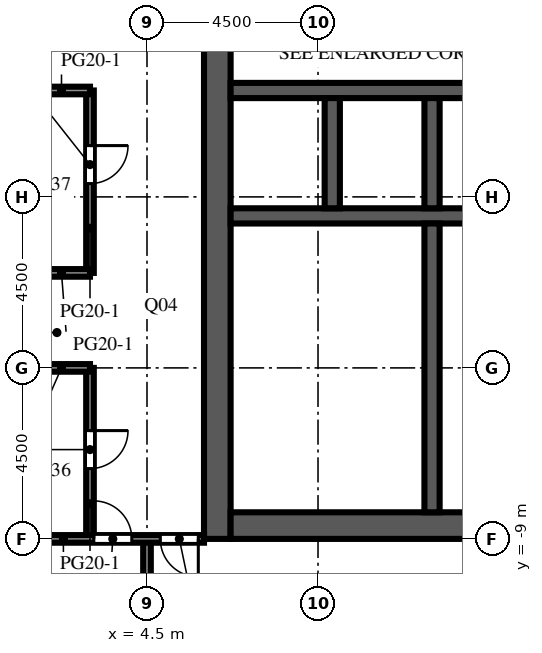
"""IFC4 building model, lengths in metres.
Left out: names, types, materials, properties, quantities, classifications, styles, units other than length and angle.
Written with IfcOpenShell. Run it as: python <this file> out.ifc"""

import sys

from ifc_helpers import new_model, si_unit, direction, frame, frame_2d, origin, place, context, subcontext, project, spatial, rectangle, extrude, element, fill, save


model = new_model("IFC4")
c1 = context("Model", 3, precision=1e-05, world=origin(), true_north=direction((0.0, 1.0)))
c2 = subcontext(c1, "Body", "Model", "MODEL_VIEW")
j1 = project(units=[si_unit("LENGTHUNIT", "METRE"), si_unit("PLANEANGLEUNIT", "RADIAN")], contexts=[c1])
p1 = place(None, origin())
s1 = spatial("IfcSite", under=j1, at=p1, CompositionType="ELEMENT")
p2 = place(p1, origin())
s2 = spatial("IfcBuilding", under=s1, at=p2, CompositionType="ELEMENT")
p3 = place(p2, frame((0.0, 0.0, 239.8)))
s3 = spatial("IfcBuildingStorey", under=s2, at=p3, CompositionType="ELEMENT", Elevation=239.8)
p4 = place(p3, frame((6.35, -9.0, 0.0), z_axis=(0.0, 0.0, 1.0), x_axis=(0.0, 1.0, 0.0)))
e1 = element("IfcWall", 1, at=p4, inside=s3, PredefinedType="SHEAR", context=c2, shape_type="SweptSolid", body=[
    extrude(rectangle(XDim=27.5, YDim=0.7, at=frame_2d((13.75, 0.0))), origin(), (0.0, 0.0, 1.0), 4.1),
])
p5 = place(p4, frame((12.55, 0.0, 0.0)))
e2 = element("IfcOpeningElement", 2, at=p5, cuts=e1, PredefinedType="OPENING", context=c2, shape_type="SweptSolid", body=[
    extrude(rectangle(XDim=2.4, YDim=2.4, at=frame_2d((1.2, 1.2))), frame((0.0, 0.36, 0.0), z_axis=(0.0, -1.0, 0.0), x_axis=(1.0, 0.0, 0.0)), (0.0, 0.0, 1.0), 0.72),
])
p6 = place(p4, frame((5.42, 0.0, 0.0)))
e3 = element("IfcOpeningElement", 3, at=p6, cuts=e1, PredefinedType="OPENING", context=c2, shape_type="SweptSolid", body=[
    extrude(rectangle(XDim=1.2, YDim=2.1, at=frame_2d((0.6, 1.05))), frame((0.0, 0.36, 0.0), z_axis=(0.0, -1.0, 0.0), x_axis=(1.0, 0.0, 0.0)), (0.0, 0.0, 1.0), 0.72),
])
p7 = place(p4, frame((19.46, 0.0, 0.0)))
e4 = element("IfcOpeningElement", 4, at=p7, cuts=e1, PredefinedType="OPENING", context=c2, shape_type="SweptSolid", body=[
    extrude(rectangle(XDim=1.0, YDim=2.1, at=frame_2d((0.5, 1.05))), frame((0.0, 0.36, 0.0), z_axis=(0.0, -1.0, 0.0), x_axis=(1.0, 0.0, 0.0)), (0.0, 0.0, 1.0), 0.72),
])
p8 = place(p4, frame((21.17, 0.0, 0.0)))
e5 = element("IfcOpeningElement", 5, at=p8, cuts=e1, PredefinedType="OPENING", context=c2, shape_type="SweptSolid", body=[
    extrude(rectangle(XDim=1.0, YDim=2.1, at=frame_2d((0.5, 1.05))), frame((0.0, 0.36, 0.0), z_axis=(0.0, -1.0, 0.0), x_axis=(1.0, 0.0, 0.0)), (0.0, 0.0, 1.0), 0.72),
])
p9 = place(p4, frame((23.26, 0.0, 0.0)))
e6 = element("IfcOpeningElement", 6, at=p9, cuts=e1, PredefinedType="OPENING", context=c2, shape_type="SweptSolid", body=[
    extrude(rectangle(XDim=1.0, YDim=2.1, at=frame_2d((0.5, 1.05))), frame((0.0, 0.36, 0.0), z_axis=(0.0, -1.0, 0.0), x_axis=(1.0, 0.0, 0.0)), (0.0, 0.0, 1.0), 0.72),
])
p10 = place(p4, frame((25.35, 0.0, 0.0)))
e7 = element("IfcOpeningElement", 7, at=p10, cuts=e1, PredefinedType="OPENING", context=c2, shape_type="SweptSolid", body=[
    extrude(rectangle(XDim=1.0, YDim=2.1, at=frame_2d((0.5, 1.05))), frame((0.0, 0.36, 0.0), z_axis=(0.0, -1.0, 0.0), x_axis=(1.0, 0.0, 0.0)), (0.0, 0.0, 1.0), 0.72),
])
p11 = place(p3, frame((6.7, -8.65, 0.0), z_axis=(0.0, 0.0, 1.0), x_axis=(1.0, 0.0, 0.0)))
e8 = element("IfcWall", 8, at=p11, inside=s3, PredefinedType="SHEAR", context=c2, shape_type="SweptSolid", body=[
    extrude(rectangle(XDim=10.6, YDim=0.7, at=frame_2d((5.3, 0.0))), origin(), (0.0, 0.0, 1.0), 4.1),
])
p12 = place(p3, frame((6.7, -0.5, 0.0), z_axis=(0.0, 0.0, 1.0), x_axis=(1.0, 0.0, 0.0)))
e9 = element("IfcWall", 9, at=p12, inside=s3, PredefinedType="SHEAR", context=c2, shape_type="SweptSolid", body=[
    extrude(rectangle(XDim=10.6, YDim=0.4, at=frame_2d((5.3, 0.0))), origin(), (0.0, 0.0, 1.0), 4.1),
])
p13 = place(p3, frame((6.7, 2.8, 0.0), z_axis=(0.0, 0.0, 1.0), x_axis=(1.0, 0.0, 0.0)))
e10 = element("IfcWall", 10, at=p13, inside=s3, PredefinedType="SHEAR", context=c2, shape_type="SweptSolid", body=[
    extrude(rectangle(XDim=10.6, YDim=0.4, at=frame_2d((5.3, 0.0))), origin(), (0.0, 0.0, 1.0), 4.1),
])
p14 = place(p13, frame((0.688, 0.0, 0.0)))
e11 = element("IfcOpeningElement", 11, at=p14, cuts=e10, PredefinedType="OPENING", context=c2, shape_type="SweptSolid", body=[
    extrude(rectangle(XDim=1.1, YDim=2.1, at=frame_2d((0.55, 1.05))), frame((0.0, 0.21, 0.0), z_axis=(0.0, -1.0, 0.0), x_axis=(1.0, 0.0, 0.0)), (0.0, 0.0, 1.0), 0.42),
])
p15 = place(p13, frame((3.438, 0.0, 0.0)))
e12 = element("IfcOpeningElement", 12, at=p15, cuts=e10, PredefinedType="OPENING", context=c2, shape_type="SweptSolid", body=[
    extrude(rectangle(XDim=1.1, YDim=2.1, at=frame_2d((0.55, 1.05))), frame((0.0, 0.21, 0.0), z_axis=(0.0, -1.0, 0.0), x_axis=(1.0, 0.0, 0.0)), (0.0, 0.0, 1.0), 0.42),
])
p16 = place(p13, frame((6.113, 0.0, 0.0)))
e13 = element("IfcOpeningElement", 13, at=p16, cuts=e10, PredefinedType="OPENING", context=c2, shape_type="SweptSolid", body=[
    extrude(rectangle(XDim=1.0, YDim=2.1, at=frame_2d((0.5, 1.05))), frame((0.0, 0.21, 0.0), z_axis=(0.0, -1.0, 0.0), x_axis=(1.0, 0.0, 0.0)), (0.0, 0.0, 1.0), 0.42),
])
p17 = place(p13, frame((8.863, 0.0, 0.0)))
e14 = element("IfcOpeningElement", 14, at=p17, cuts=e10, PredefinedType="OPENING", context=c2, shape_type="SweptSolid", body=[
    extrude(rectangle(XDim=1.0, YDim=2.1, at=frame_2d((0.5, 1.05))), frame((0.0, 0.21, 0.0), z_axis=(0.0, -1.0, 0.0), x_axis=(1.0, 0.0, 0.0)), (0.0, 0.0, 1.0), 0.42),
])
for number, where, z_axis, x_axis in (
    (15, (9.375, -0.3, 0.0), (0.0, 0.0, 1.0), (0.0, 1.0, 0.0)),
    (16, (12.0, -0.3, 0.0), (0.0, 0.0, 1.0), (0.0, 1.0, 0.0)),
):
    element("IfcWall", number, at=place(p3, frame(where, z_axis=z_axis, x_axis=x_axis)), inside=s3, PredefinedType="SHEAR", context=c2, shape_type="SweptSolid", body=[
        extrude(rectangle(XDim=2.9, YDim=0.4, at=frame_2d((1.45, 0.0))), origin(), (0.0, 0.0, 1.0), 4.1),
    ])
p18 = place(p3, frame((12.0, -8.3, 0.0), z_axis=(0.0, 0.0, 1.0), x_axis=(0.0, 1.0, 0.0)))
e17 = element("IfcWall", 17, at=p18, inside=s3, PredefinedType="SHEAR", context=c2, shape_type="SweptSolid", body=[
    extrude(rectangle(XDim=7.6, YDim=0.4, at=frame_2d((3.8, 0.0))), origin(), (0.0, 0.0, 1.0), 4.1),
])
p19 = place(p3, frame((6.7, -5.26, 0.0), z_axis=(0.0, 0.0, 1.0), x_axis=(1.0, 0.0, 0.0)))
e18 = element("IfcWall", 18, at=p19, inside=s3, PredefinedType="PARTITIONING", context=c2, shape_type="SweptSolid", body=[
    extrude(rectangle(XDim=1.5, YDim=0.1, at=frame_2d((0.75, 0.0))), origin(), (0.0, 0.0, 1.0), 3.65),
])
p20 = place(p19, frame((0.25, 0.0, 0.0)))
e19 = element("IfcOpeningElement", 19, at=p20, cuts=e18, PredefinedType="OPENING", context=c2, shape_type="SweptSolid", body=[
    extrude(rectangle(XDim=1.0, YDim=2.1, at=frame_2d((0.5, 1.05))), frame((0.0, 0.06, 0.0), z_axis=(0.0, -1.0, 0.0), x_axis=(1.0, 0.0, 0.0)), (0.0, 0.0, 1.0), 0.12),
])
p21 = place(p3, frame((8.2, -5.26, 0.0), z_axis=(0.0, 0.0, 1.0), x_axis=(0.0, 1.0, 0.0)))
e20 = element("IfcWall", 20, at=p21, inside=s3, PredefinedType="PARTITIONING", context=c2, shape_type="SweptSolid", body=[
    extrude(rectangle(XDim=2.28, YDim=0.1, at=frame_2d((1.14, 0.0))), origin(), (0.0, 0.0, 1.0), 3.65),
])
p22 = place(p21, frame((0.64, 0.0, 0.0)))
e21 = element("IfcOpeningElement", 21, at=p22, cuts=e20, PredefinedType="OPENING", context=c2, shape_type="SweptSolid", body=[
    extrude(rectangle(XDim=1.0, YDim=2.1, at=frame_2d((0.5, 1.05))), frame((0.0, 0.06, 0.0), z_axis=(0.0, -1.0, 0.0), x_axis=(1.0, 0.0, 0.0)), (0.0, 0.0, 1.0), 0.12),
])
p23 = place(p3, frame((8.2, -2.98, 0.0), z_axis=(0.0, 0.0, 1.0), x_axis=(0.0, 1.0, 0.0)))
e22 = element("IfcWall", 22, at=p23, inside=s3, PredefinedType="PARTITIONING", context=c2, shape_type="SweptSolid", body=[
    extrude(rectangle(XDim=2.28, YDim=0.1, at=frame_2d((1.14, 0.0))), origin(), (0.0, 0.0, 1.0), 3.65),
])
p24 = place(p23, frame((0.64, 0.0, 0.0)))
e23 = element("IfcOpeningElement", 23, at=p24, cuts=e22, PredefinedType="OPENING", context=c2, shape_type="SweptSolid", body=[
    extrude(rectangle(XDim=1.0, YDim=2.1, at=frame_2d((0.5, 1.05))), frame((0.0, 0.06, 0.0), z_axis=(0.0, -1.0, 0.0), x_axis=(1.0, 0.0, 0.0)), (0.0, 0.0, 1.0), 0.12),
])
for number, where, z_axis, x_axis in (
    (24, (8.2, -5.26, 0.0), (0.0, 0.0, 1.0), (1.0, 0.0, 0.0)),
    (25, (8.2, -2.98, 0.0), (0.0, 0.0, 1.0), (1.0, 0.0, 0.0)),
):
    element("IfcWall", number, at=place(p3, frame(where, z_axis=z_axis, x_axis=x_axis)), inside=s3, PredefinedType="PARTITIONING", context=c2, shape_type="SweptSolid", body=[
        extrude(rectangle(XDim=3.6, YDim=0.1, at=frame_2d((1.8, 0.0))), origin(), (0.0, 0.0, 1.0), 3.65),
    ])
p25 = place(p3, frame((3.0, -9.0, 0.0), z_axis=(0.0, 0.0, 1.0), x_axis=(0.0, 1.0, 0.0)))
e26 = element("IfcWall", 26, at=p25, inside=s3, PredefinedType="PARTITIONING", context=c2, shape_type="SweptSolid", body=[
    extrude(rectangle(XDim=4.5, YDim=0.2, at=frame_2d((2.25, 0.0))), origin(), (0.0, 0.0, 1.0), 3.65),
])
p26 = place(p25, frame((1.85, 0.0, 0.0)))
e27 = element("IfcOpeningElement", 27, at=p26, cuts=e26, PredefinedType="OPENING", context=c2, shape_type="SweptSolid", body=[
    extrude(rectangle(XDim=1.0, YDim=2.1, at=frame_2d((0.5, 1.05))), frame((0.0, 0.11, 0.0), z_axis=(0.0, -1.0, 0.0), x_axis=(1.0, 0.0, 0.0)), (0.0, 0.0, 1.0), 0.22),
])
p27 = place(p3, frame((3.0, -2.0, 0.0), z_axis=(0.0, 0.0, 1.0), x_axis=(0.0, 1.0, 0.0)))
e28 = element("IfcWall", 28, at=p27, inside=s3, PredefinedType="PARTITIONING", context=c2, shape_type="SweptSolid", body=[
    extrude(rectangle(XDim=4.8, YDim=0.2, at=frame_2d((2.4, 0.0))), origin(), (0.0, 0.0, 1.0), 3.65),
])
p28 = place(p27, frame((2.35, 0.0, 0.0)))
e29 = element("IfcOpeningElement", 29, at=p28, cuts=e28, PredefinedType="OPENING", context=c2, shape_type="SweptSolid", body=[
    extrude(rectangle(XDim=1.0, YDim=2.1, at=frame_2d((0.5, 1.05))), frame((0.0, 0.11, 0.0), z_axis=(0.0, -1.0, 0.0), x_axis=(1.0, 0.0, 0.0)), (0.0, 0.0, 1.0), 0.22),
])
p29 = place(p3, frame((4.5, -22.1, 0.0), z_axis=(0.0, 0.0, 1.0), x_axis=(0.0, 1.0, 0.0)))
e30 = element("IfcWall", 30, at=p29, inside=s3, PredefinedType="PARTITIONING", context=c2, shape_type="SweptSolid", body=[
    extrude(rectangle(XDim=13.1, YDim=0.2, at=frame_2d((6.55, 0.0))), origin(), (0.0, 0.0, 1.0), 3.65),
])
p30 = place(p3, frame((6.0, -9.0, 0.0), z_axis=(0.0, 0.0, 1.0), x_axis=(-1.0, 0.0, 0.0)))
e31 = element("IfcWall", 31, at=p30, inside=s3, PredefinedType="PARTITIONING", context=c2, shape_type="SweptSolid", body=[
    extrude(rectangle(XDim=4.5, YDim=0.2, at=frame_2d((2.25, 0.0))), origin(), (0.0, 0.0, 1.0), 3.65),
])
p31 = place(p30, frame((1.9, 0.0, 0.0)))
e32 = element("IfcOpeningElement", 32, at=p31, cuts=e31, PredefinedType="OPENING", context=c2, shape_type="SweptSolid", body=[
    extrude(rectangle(XDim=1.0, YDim=2.1, at=frame_2d((0.5, 1.05))), frame((0.0, 0.11, 0.0), z_axis=(0.0, -1.0, 0.0), x_axis=(1.0, 0.0, 0.0)), (0.0, 0.0, 1.0), 0.22),
])
p32 = place(p30, frame((0.15, 0.0, 0.0)))
e33 = element("IfcOpeningElement", 33, at=p32, cuts=e31, PredefinedType="OPENING", context=c2, shape_type="SweptSolid", body=[
    extrude(rectangle(XDim=1.0, YDim=2.1, at=frame_2d((0.5, 1.05))), frame((0.0, 0.11, 0.0), z_axis=(0.0, -1.0, 0.0), x_axis=(1.0, 0.0, 0.0)), (0.0, 0.0, 1.0), 0.22),
])
for number, where, z_axis, x_axis in (
    (34, (1.5, -4.5, 0.0), (0.0, 0.0, 1.0), (1.0, 0.0, 0.0)),
    (35, (1.5, -2.0, 0.0), (0.0, 0.0, 1.0), (1.0, 0.0, 0.0)),
    (36, (1.5, 2.8, 0.0), (0.0, 0.0, 1.0), (1.0, 0.0, 0.0)),
):
    element("IfcWall", number, at=place(p3, frame(where, z_axis=z_axis, x_axis=x_axis)), inside=s3, PredefinedType="PARTITIONING", context=c2, shape_type="SweptSolid", body=[
        extrude(rectangle(XDim=1.5, YDim=0.2, at=frame_2d((0.75, 0.0))), origin(), (0.0, 0.0, 1.0), 3.65),
    ])
p33 = place(p14, origin())
e37 = element("IfcDoor", 37, at=p33, inside=s3, OperationType="DOUBLE_DOOR_SLIDING", PredefinedType="DOOR", context=c2, shape_type="SweptSolid", body=[
    extrude(rectangle(XDim=1.1, YDim=2.1, at=frame_2d((0.55, 1.05))), frame((0.0, 0.025, 0.0), z_axis=(0.0, -1.0, 0.0), x_axis=(1.0, 0.0, 0.0)), (0.0, 0.0, 1.0), 0.05),
])
fill(e11, e37)
p34 = place(p15, origin())
e38 = element("IfcDoor", 38, at=p34, inside=s3, OperationType="DOUBLE_DOOR_SLIDING", PredefinedType="DOOR", context=c2, shape_type="SweptSolid", body=[
    extrude(rectangle(XDim=1.1, YDim=2.1, at=frame_2d((0.55, 1.05))), frame((0.0, 0.025, 0.0), z_axis=(0.0, -1.0, 0.0), x_axis=(1.0, 0.0, 0.0)), (0.0, 0.0, 1.0), 0.05),
])
fill(e12, e38)
p35 = place(p5, origin())
e39 = element("IfcDoor", 39, at=p35, inside=s3, OperationType="DOUBLE_DOOR_DOUBLE_SWING", PredefinedType="DOOR", context=c2, shape_type="SweptSolid", body=[
    extrude(rectangle(XDim=2.4, YDim=2.4, at=frame_2d((1.2, 1.2))), frame((0.0, 0.025, 0.0), z_axis=(0.0, -1.0, 0.0), x_axis=(1.0, 0.0, 0.0)), (0.0, 0.0, 1.0), 0.05),
])
fill(e2, e39)
p36 = place(p6, origin())
e40 = element("IfcDoor", 40, at=p36, inside=s3, OperationType="SINGLE_SWING_RIGHT", PredefinedType="DOOR", context=c2, shape_type="SweptSolid", body=[
    extrude(rectangle(XDim=1.2, YDim=2.1, at=frame_2d((0.6, 1.05))), frame((0.0, -0.275, 0.0), z_axis=(0.0, -1.0, 0.0), x_axis=(1.0, 0.0, 0.0)), (0.0, 0.0, 1.0), 0.05),
])
fill(e3, e40)
p37 = place(p20, origin())
e41 = element("IfcDoor", 41, at=p37, inside=s3, OperationType="SINGLE_SWING_LEFT", PredefinedType="DOOR", context=c2, shape_type="SweptSolid", body=[
    extrude(rectangle(XDim=1.0, YDim=2.1, at=frame_2d((0.5, 1.05))), frame((0.0, 0.025, 0.0), z_axis=(0.0, -1.0, 0.0), x_axis=(1.0, 0.0, 0.0)), (0.0, 0.0, 1.0), 0.05),
])
fill(e19, e41)
p38 = place(p22, origin())
e42 = element("IfcDoor", 42, at=p38, inside=s3, OperationType="SINGLE_SWING_RIGHT", PredefinedType="DOOR", context=c2, shape_type="SweptSolid", body=[
    extrude(rectangle(XDim=1.0, YDim=2.1, at=frame_2d((0.5, 1.05))), frame((0.0, 0.025, 0.0), z_axis=(0.0, -1.0, 0.0), x_axis=(1.0, 0.0, 0.0)), (0.0, 0.0, 1.0), 0.05),
])
fill(e21, e42)
p39 = place(p24, origin())
e43 = element("IfcDoor", 43, at=p39, inside=s3, OperationType="SINGLE_SWING_LEFT", PredefinedType="DOOR", context=c2, shape_type="SweptSolid", body=[
    extrude(rectangle(XDim=1.0, YDim=2.1, at=frame_2d((0.5, 1.05))), frame((0.0, 0.025, 0.0), z_axis=(0.0, -1.0, 0.0), x_axis=(1.0, 0.0, 0.0)), (0.0, 0.0, 1.0), 0.05),
])
fill(e23, e43)
p40 = place(p31, origin())
e44 = element("IfcDoor", 44, at=p40, inside=s3, OperationType="SINGLE_SWING_RIGHT", PredefinedType="DOOR", context=c2, shape_type="SweptSolid", body=[
    extrude(rectangle(XDim=1.0, YDim=2.1, at=frame_2d((0.5, 1.05))), frame((0.0, 0.025, 0.0), z_axis=(0.0, -1.0, 0.0), x_axis=(1.0, 0.0, 0.0)), (0.0, 0.0, 1.0), 0.05),
])
fill(e32, e44)
p41 = place(p32, origin())
e45 = element("IfcDoor", 45, at=p41, inside=s3, OperationType="SINGLE_SWING_LEFT", PredefinedType="DOOR", context=c2, shape_type="SweptSolid", body=[
    extrude(rectangle(XDim=1.0, YDim=2.1, at=frame_2d((0.5, 1.05))), frame((0.0, 0.025, 0.0), z_axis=(0.0, -1.0, 0.0), x_axis=(1.0, 0.0, 0.0)), (0.0, 0.0, 1.0), 0.05),
])
fill(e33, e45)
p42 = place(p26, origin())
e46 = element("IfcDoor", 46, at=p42, inside=s3, OperationType="SINGLE_SWING_RIGHT", PredefinedType="DOOR", context=c2, shape_type="SweptSolid", body=[
    extrude(rectangle(XDim=1.0, YDim=2.1, at=frame_2d((0.5, 1.05))), frame((0.0, 0.025, 0.0), z_axis=(0.0, -1.0, 0.0), x_axis=(1.0, 0.0, 0.0)), (0.0, 0.0, 1.0), 0.05),
])
fill(e27, e46)
p43 = place(p28, origin())
e47 = element("IfcDoor", 47, at=p43, inside=s3, OperationType="SINGLE_SWING_RIGHT", PredefinedType="DOOR", context=c2, shape_type="SweptSolid", body=[
    extrude(rectangle(XDim=1.0, YDim=2.1, at=frame_2d((0.5, 1.05))), frame((0.0, 0.025, 0.0), z_axis=(0.0, -1.0, 0.0), x_axis=(1.0, 0.0, 0.0)), (0.0, 0.0, 1.0), 0.05),
])
fill(e29, e47)
save(model, sys.argv[1])
